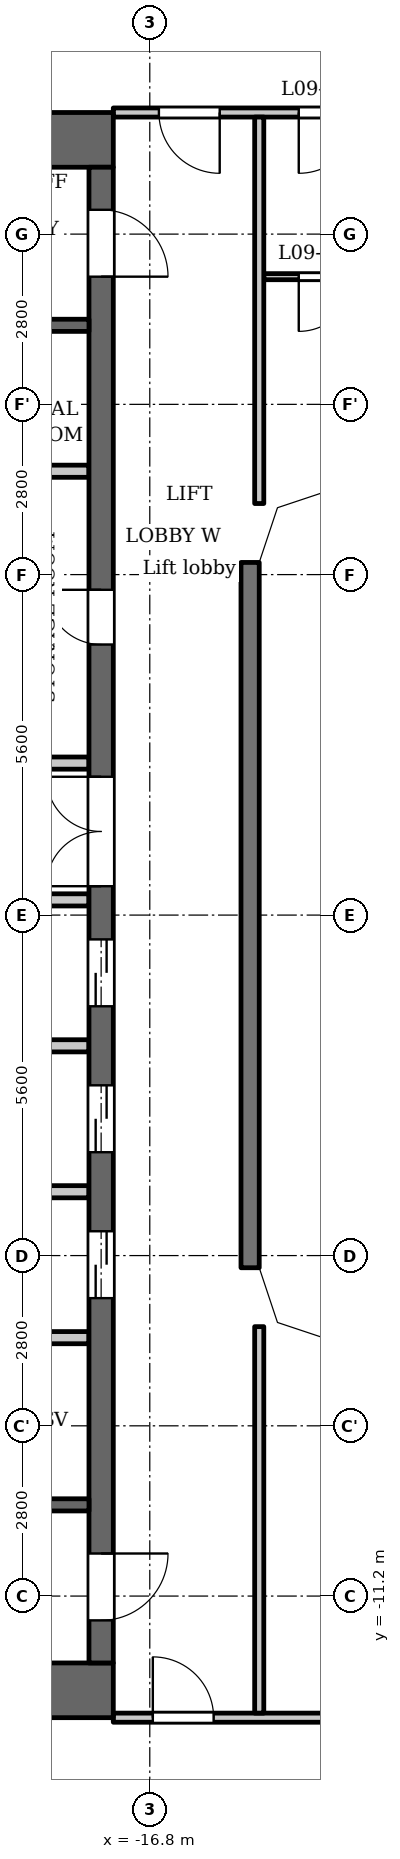
"""IFC4 building model, lengths in metres.
Left out: names, types, materials, properties, quantities, classifications, styles, units other than length and angle.
Written with IfcOpenShell. Run it as: python <this file> out.ifc"""

import sys

from ifc_helpers import new_model, si_unit, direction, frame, frame_2d, origin, place, context, subcontext, project, spatial, polyline, rectangle, outline, extrude, element, fill, save


model = new_model("IFC4")
c1 = context("Model", 3, precision=1e-05, world=origin(), true_north=direction((0.0, 1.0)))
c2 = subcontext(c1, "Body", "Model", "MODEL_VIEW")
j1 = project(units=[si_unit("LENGTHUNIT", "METRE"), si_unit("PLANEANGLEUNIT", "RADIAN")], contexts=[c1])
p1 = place(None, origin())
s1 = spatial("IfcSite", under=j1, at=p1, CompositionType="ELEMENT")
p2 = place(p1, origin())
s2 = spatial("IfcBuilding", under=s1, at=p2, CompositionType="ELEMENT")
p3 = place(p2, frame((0.0, 0.0, 41.0)))
s3 = spatial("IfcBuildingStorey", under=s2, at=p3, CompositionType="ELEMENT", Elevation=41.0)
p4 = place(p3, frame((-15.15, -5.8, 0.0), z_axis=(0.0, 0.0, 1.0), x_axis=(0.0, 1.0, 0.0)))
e1 = element("IfcWall", 1, at=p4, inside=s3, PredefinedType="SOLIDWALL", context=c2, shape_type="SweptSolid", body=[
    extrude(rectangle(XDim=11.6, YDim=0.3, at=frame_2d((5.8, 0.0))), origin(), (0.0, 0.0, 1.0), 3.2),
])
for number, where, z_axis, x_axis in (
    (2, (-17.4, 12.75, 0.0), (0.0, 0.0, 1.0), (-1.0, 0.0, 0.0)),
    (3, (-17.4, -12.75, 0.0), (0.0, 0.0, 1.0), (-1.0, 0.0, 0.0)),
):
    element("IfcWall", number, at=place(p3, frame(where, z_axis=z_axis, x_axis=x_axis)), inside=s3, PredefinedType="SHEAR", context=c2, shape_type="SweptSolid", body=[
        extrude(rectangle(XDim=10.4, YDim=0.9, at=frame_2d((5.2, 0.0))), origin(), (0.0, 0.0, 1.0), 3.2),
    ])
p5 = place(p3, frame((-17.6, -12.3, 0.0), z_axis=(0.0, 0.0, 1.0), x_axis=(0.0, 1.0, 0.0)))
e4 = element("IfcWall", 4, at=p5, inside=s3, PredefinedType="SHEAR", context=c2, shape_type="SweptSolid", body=[
    extrude(rectangle(XDim=24.6, YDim=0.4, at=frame_2d((12.3, 0.0))), origin(), (0.0, 0.0, 1.0), 3.2),
])
p6 = place(p5, frame((6.0, 0.0, 0.0)))
e5 = element("IfcOpeningElement", 5, at=p6, cuts=e4, PredefinedType="OPENING", context=c2, shape_type="SweptSolid", body=[
    extrude(rectangle(XDim=1.1, YDim=2.1, at=frame_2d((0.55, 1.05))), frame((0.0, 0.21, 0.0), z_axis=(0.0, -1.0, 0.0), x_axis=(1.0, 0.0, 0.0)), (0.0, 0.0, 1.0), 0.42),
])
p7 = place(p5, frame((8.4, 0.0, 0.0)))
e6 = element("IfcOpeningElement", 6, at=p7, cuts=e4, PredefinedType="OPENING", context=c2, shape_type="SweptSolid", body=[
    extrude(rectangle(XDim=1.1, YDim=2.1, at=frame_2d((0.55, 1.05))), frame((0.0, 0.21, 0.0), z_axis=(0.0, -1.0, 0.0), x_axis=(1.0, 0.0, 0.0)), (0.0, 0.0, 1.0), 0.42),
])
p8 = place(p5, frame((10.8, 0.0, 0.0)))
e7 = element("IfcOpeningElement", 7, at=p8, cuts=e4, PredefinedType="OPENING", context=c2, shape_type="SweptSolid", body=[
    extrude(rectangle(XDim=1.1, YDim=2.1, at=frame_2d((0.55, 1.05))), frame((0.0, 0.21, 0.0), z_axis=(0.0, -1.0, 0.0), x_axis=(1.0, 0.0, 0.0)), (0.0, 0.0, 1.0), 0.42),
])
p9 = place(p5, frame((16.75, 0.0, 0.0)))
e8 = element("IfcOpeningElement", 8, at=p9, cuts=e4, PredefinedType="OPENING", context=c2, shape_type="SweptSolid", body=[
    extrude(rectangle(XDim=0.9, YDim=2.1, at=frame_2d((0.45, 1.05))), frame((0.0, 0.21, 0.0), z_axis=(0.0, -1.0, 0.0), x_axis=(1.0, 0.0, 0.0)), (0.0, 0.0, 1.0), 0.42),
])
p10 = place(p5, frame((22.8, 0.0, 0.0)))
e9 = element("IfcOpeningElement", 9, at=p10, cuts=e4, PredefinedType="OPENING", context=c2, shape_type="SweptSolid", body=[
    extrude(rectangle(XDim=1.1, YDim=2.1, at=frame_2d((0.55, 1.05))), frame((0.0, 0.21, 0.0), z_axis=(0.0, -1.0, 0.0), x_axis=(1.0, 0.0, 0.0)), (0.0, 0.0, 1.0), 0.42),
])
p11 = place(p5, frame((0.7, 0.0, 0.0)))
e10 = element("IfcOpeningElement", 10, at=p11, cuts=e4, PredefinedType="OPENING", context=c2, shape_type="SweptSolid", body=[
    extrude(rectangle(XDim=1.1, YDim=2.1, at=frame_2d((0.55, 1.05))), frame((0.0, 0.21, 0.0), z_axis=(0.0, -1.0, 0.0), x_axis=(1.0, 0.0, 0.0)), (0.0, 0.0, 1.0), 0.42),
])
p12 = place(p5, frame((12.775, 0.0, 0.0)))
e11 = element("IfcOpeningElement", 11, at=p12, cuts=e4, PredefinedType="OPENING", context=c2, shape_type="SweptSolid", body=[
    extrude(rectangle(XDim=1.8, YDim=2.1, at=frame_2d((0.9, 1.05))), frame((0.0, 0.21, 0.0), z_axis=(0.0, -1.0, 0.0), x_axis=(1.0, 0.0, 0.0)), (0.0, 0.0, 1.0), 0.42),
])
p13 = place(p3, frame((-17.8, -9.7, 0.0), z_axis=(0.0, 0.0, 1.0), x_axis=(-1.0, 0.0, 0.0)))
e12 = element("IfcWall", 12, at=p13, inside=s3, PredefinedType="SHEAR", context=c2, shape_type="SweptSolid", body=[
    extrude(rectangle(XDim=8.3, YDim=0.2, at=frame_2d((4.15, 0.0))), origin(), (0.0, 0.0, 1.0), 3.2),
])
p14 = place(p13, frame((0.85, 0.0, 0.0)))
e13 = element("IfcOpeningElement", 13, at=p14, cuts=e12, PredefinedType="OPENING", context=c2, shape_type="SweptSolid", body=[
    extrude(rectangle(XDim=1.1, YDim=2.1, at=frame_2d((0.55, 1.05))), frame((0.0, 0.11, 0.0), z_axis=(0.0, -1.0, 0.0), x_axis=(1.0, 0.0, 0.0)), (0.0, 0.0, 1.0), 0.22),
])
p15 = place(p13, frame((3.75, 0.0, 0.0)))
e14 = element("IfcOpeningElement", 14, at=p15, cuts=e12, PredefinedType="OPENING", context=c2, shape_type="SweptSolid", body=[
    extrude(rectangle(XDim=1.1, YDim=2.1, at=frame_2d((0.55, 1.05))), frame((0.0, 0.11, 0.0), z_axis=(0.0, -1.0, 0.0), x_axis=(1.0, 0.0, 0.0)), (0.0, 0.0, 1.0), 0.22),
])
for number, where, z_axis, x_axis in (
    (15, (-17.8, -6.95, 0.0), (0.0, 0.0, 1.0), (-1.0, 0.0, 0.0)),
    (16, (-17.8, -4.55, 0.0), (0.0, 0.0, 1.0), (-1.0, 0.0, 0.0)),
    (17, (-17.8, -2.15, 0.0), (0.0, 0.0, 1.0), (-1.0, 0.0, 0.0)),
):
    element("IfcWall", number, at=place(p3, frame(where, z_axis=z_axis, x_axis=x_axis)), inside=s3, PredefinedType="PARTITIONING", context=c2, shape_type="SweptSolid", body=[
        extrude(rectangle(XDim=2.8, YDim=0.2, at=frame_2d((1.4, 0.0))), origin(), (0.0, 0.0, 1.0), 3.2),
    ])
p16 = place(p3, frame((-17.8, 0.25, 0.0), z_axis=(0.0, 0.0, 1.0), x_axis=(-1.0, 0.0, 0.0)))
e18 = element("IfcWall", 18, at=p16, inside=s3, PredefinedType="PARTITIONING", context=c2, shape_type="SweptSolid", body=[
    extrude(rectangle(XDim=3.0, YDim=0.2, at=frame_2d((1.5, 0.0))), origin(), (0.0, 0.0, 1.0), 3.2),
])
p17 = place(p3, frame((-17.8, 2.5, 0.0), z_axis=(0.0, 0.0, 1.0), x_axis=(-1.0, 0.0, 0.0)))
e19 = element("IfcWall", 19, at=p17, inside=s3, PredefinedType="PARTITIONING", context=c2, shape_type="SweptSolid", body=[
    extrude(rectangle(XDim=3.0, YDim=0.2, at=frame_2d((1.5, 0.0))), origin(), (0.0, 0.0, 1.0), 3.2),
])
p18 = place(p17, frame((1.7, 0.0, 0.0)))
e20 = element("IfcOpeningElement", 20, at=p18, cuts=e19, PredefinedType="OPENING", context=c2, shape_type="SweptSolid", body=[
    extrude(rectangle(XDim=0.9, YDim=2.1, at=frame_2d((0.45, 1.05))), frame((0.0, 0.11, 0.0), z_axis=(0.0, -1.0, 0.0), x_axis=(1.0, 0.0, 0.0)), (0.0, 0.0, 1.0), 0.22),
])
p19 = place(p3, frame((-17.8, 7.3, 0.0), z_axis=(0.0, 0.0, 1.0), x_axis=(-1.0, 0.0, 0.0)))
e21 = element("IfcWall", 21, at=p19, inside=s3, PredefinedType="PARTITIONING", context=c2, shape_type="SweptSolid", body=[
    extrude(rectangle(XDim=2.8, YDim=0.2, at=frame_2d((1.4, 0.0))), origin(), (0.0, 0.0, 1.0), 3.2),
])
p20 = place(p3, frame((-17.8, 9.7, 0.0), z_axis=(0.0, 0.0, 1.0), x_axis=(-1.0, 0.0, 0.0)))
e22 = element("IfcWall", 22, at=p20, inside=s3, PredefinedType="SHEAR", context=c2, shape_type="SweptSolid", body=[
    extrude(rectangle(XDim=8.3, YDim=0.2, at=frame_2d((4.15, 0.0))), origin(), (0.0, 0.0, 1.0), 3.2),
])
p21 = place(p20, frame((0.85, 0.0, 0.0)))
e23 = element("IfcOpeningElement", 23, at=p21, cuts=e22, PredefinedType="OPENING", context=c2, shape_type="SweptSolid", body=[
    extrude(rectangle(XDim=1.1, YDim=2.1, at=frame_2d((0.55, 1.05))), frame((0.0, 0.11, 0.0), z_axis=(0.0, -1.0, 0.0), x_axis=(1.0, 0.0, 0.0)), (0.0, 0.0, 1.0), 0.22),
])
p22 = place(p20, frame((3.75, 0.0, 0.0)))
e24 = element("IfcOpeningElement", 24, at=p22, cuts=e22, PredefinedType="OPENING", context=c2, shape_type="SweptSolid", body=[
    extrude(rectangle(XDim=1.1, YDim=2.1, at=frame_2d((0.55, 1.05))), frame((0.0, 0.11, 0.0), z_axis=(0.0, -1.0, 0.0), x_axis=(1.0, 0.0, 0.0)), (0.0, 0.0, 1.0), 0.22),
])
p23 = place(p3, frame((-17.4, -13.2, 0.0), z_axis=(0.0, 0.0, 1.0), x_axis=(1.0, 0.0, 0.0)))
e25 = element("IfcWall", 25, at=p23, inside=s3, PredefinedType="PARTITIONING", context=c2, shape_type="SweptSolid", body=[
    extrude(rectangle(XDim=34.8, YDim=0.15, at=frame_2d((17.4, 0.0))), origin(), (0.0, 0.0, 1.0), 3.2),
])
p24 = place(p23, frame((0.65, 0.0, 0.0)))
e26 = element("IfcOpeningElement", 26, at=p24, cuts=e25, PredefinedType="OPENING", context=c2, shape_type="SweptSolid", body=[
    extrude(rectangle(XDim=1.0, YDim=2.1, at=frame_2d((0.5, 1.05))), frame((0.0, 0.085, 0.0), z_axis=(0.0, -1.0, 0.0), x_axis=(1.0, 0.0, 0.0)), (0.0, 0.0, 1.0), 0.17),
])
p25 = place(p23, frame((33.05, 0.0, 0.0)))
e27 = element("IfcOpeningElement", 27, at=p25, cuts=e25, PredefinedType="OPENING", context=c2, shape_type="SweptSolid", body=[
    extrude(rectangle(XDim=1.0, YDim=2.1, at=frame_2d((0.5, 1.05))), frame((0.0, 0.085, 0.0), z_axis=(0.0, -1.0, 0.0), x_axis=(1.0, 0.0, 0.0)), (0.0, 0.0, 1.0), 0.17),
])
p26 = place(p23, frame((4.55, 0.0, 0.0)))
e28 = element("IfcOpeningElement", 28, at=p26, cuts=e25, PredefinedType="OPENING", context=c2, shape_type="SweptSolid", body=[
    extrude(rectangle(XDim=1.0, YDim=2.1, at=frame_2d((0.5, 1.05))), frame((0.0, 0.085, 0.0), z_axis=(0.0, -1.0, 0.0), x_axis=(1.0, 0.0, 0.0)), (0.0, 0.0, 1.0), 0.17),
])
p27 = place(p23, frame((6.9, 0.0, 0.0)))
e29 = element("IfcOpeningElement", 29, at=p27, cuts=e25, PredefinedType="OPENING", context=c2, shape_type="SweptSolid", body=[
    extrude(rectangle(XDim=1.0, YDim=2.1, at=frame_2d((0.5, 1.05))), frame((0.0, 0.085, 0.0), z_axis=(0.0, -1.0, 0.0), x_axis=(1.0, 0.0, 0.0)), (0.0, 0.0, 1.0), 0.17),
])
p28 = place(p23, frame((15.75, 0.0, 0.0)))
e30 = element("IfcOpeningElement", 30, at=p28, cuts=e25, PredefinedType="OPENING", context=c2, shape_type="SweptSolid", body=[
    extrude(rectangle(XDim=1.0, YDim=2.1, at=frame_2d((0.5, 1.05))), frame((0.0, 0.085, 0.0), z_axis=(0.0, -1.0, 0.0), x_axis=(1.0, 0.0, 0.0)), (0.0, 0.0, 1.0), 0.17),
])
p29 = place(p23, frame((18.1, 0.0, 0.0)))
e31 = element("IfcOpeningElement", 31, at=p29, cuts=e25, PredefinedType="OPENING", context=c2, shape_type="SweptSolid", body=[
    extrude(rectangle(XDim=1.0, YDim=2.1, at=frame_2d((0.5, 1.05))), frame((0.0, 0.085, 0.0), z_axis=(0.0, -1.0, 0.0), x_axis=(1.0, 0.0, 0.0)), (0.0, 0.0, 1.0), 0.17),
])
p30 = place(p23, frame((26.95, 0.0, 0.0)))
e32 = element("IfcOpeningElement", 32, at=p30, cuts=e25, PredefinedType="OPENING", context=c2, shape_type="SweptSolid", body=[
    extrude(rectangle(XDim=1.0, YDim=2.1, at=frame_2d((0.5, 1.05))), frame((0.0, 0.085, 0.0), z_axis=(0.0, -1.0, 0.0), x_axis=(1.0, 0.0, 0.0)), (0.0, 0.0, 1.0), 0.17),
])
p31 = place(p23, frame((29.25, 0.0, 0.0)))
e33 = element("IfcOpeningElement", 33, at=p31, cuts=e25, PredefinedType="OPENING", context=c2, shape_type="SweptSolid", body=[
    extrude(rectangle(XDim=1.0, YDim=2.1, at=frame_2d((0.5, 1.05))), frame((0.0, 0.085, 0.0), z_axis=(0.0, -1.0, 0.0), x_axis=(1.0, 0.0, 0.0)), (0.0, 0.0, 1.0), 0.17),
])
p32 = place(p3, frame((-14.925, 10.5, 0.0), z_axis=(0.0, 0.0, 1.0), x_axis=(1.0, 0.0, 0.0)))
e34 = element("IfcWall", 34, at=p32, inside=s3, PredefinedType="PARTITIONING", context=c2, shape_type="SweptSolid", body=[
    extrude(rectangle(XDim=29.85, YDim=0.1, at=frame_2d((14.925, 0.0))), origin(), (0.0, 0.0, 1.0), 3.2),
])
p33 = place(p32, frame((4.375, 0.0, 0.0)))
e35 = element("IfcOpeningElement", 35, at=p33, cuts=e34, PredefinedType="OPENING", context=c2, shape_type="SweptSolid", body=[
    extrude(rectangle(XDim=0.8, YDim=2.1, at=frame_2d((0.4, 1.05))), frame((0.0, 0.06, 0.0), z_axis=(0.0, -1.0, 0.0), x_axis=(1.0, 0.0, 0.0)), (0.0, 0.0, 1.0), 0.12),
])
p34 = place(p32, frame((0.575, 0.0, 0.0)))
e36 = element("IfcOpeningElement", 36, at=p34, cuts=e34, PredefinedType="OPENING", context=c2, shape_type="SweptSolid", body=[
    extrude(rectangle(XDim=0.9, YDim=2.1, at=frame_2d((0.45, 1.05))), frame((0.0, 0.06, 0.0), z_axis=(0.0, -1.0, 0.0), x_axis=(1.0, 0.0, 0.0)), (0.0, 0.0, 1.0), 0.12),
])
p35 = place(p32, frame((13.475, 0.0, 0.0)))
e37 = element("IfcOpeningElement", 37, at=p35, cuts=e34, PredefinedType="OPENING", context=c2, shape_type="SweptSolid", body=[
    extrude(rectangle(XDim=0.8, YDim=2.1, at=frame_2d((0.4, 1.05))), frame((0.0, 0.06, 0.0), z_axis=(0.0, -1.0, 0.0), x_axis=(1.0, 0.0, 0.0)), (0.0, 0.0, 1.0), 0.12),
])
p36 = place(p32, frame((9.975, 0.0, 0.0)))
e38 = element("IfcOpeningElement", 38, at=p36, cuts=e34, PredefinedType="OPENING", context=c2, shape_type="SweptSolid", body=[
    extrude(rectangle(XDim=0.9, YDim=2.1, at=frame_2d((0.45, 1.05))), frame((0.0, 0.06, 0.0), z_axis=(0.0, -1.0, 0.0), x_axis=(1.0, 0.0, 0.0)), (0.0, 0.0, 1.0), 0.12),
])
p37 = place(p32, frame((19.075, 0.0, 0.0)))
e39 = element("IfcOpeningElement", 39, at=p37, cuts=e34, PredefinedType="OPENING", context=c2, shape_type="SweptSolid", body=[
    extrude(rectangle(XDim=0.8, YDim=2.1, at=frame_2d((0.4, 1.05))), frame((0.0, 0.06, 0.0), z_axis=(0.0, -1.0, 0.0), x_axis=(1.0, 0.0, 0.0)), (0.0, 0.0, 1.0), 0.12),
])
p38 = place(p32, frame((16.075, 0.0, 0.0)))
e40 = element("IfcOpeningElement", 40, at=p38, cuts=e34, PredefinedType="OPENING", context=c2, shape_type="SweptSolid", body=[
    extrude(rectangle(XDim=0.9, YDim=2.1, at=frame_2d((0.45, 1.05))), frame((0.0, 0.06, 0.0), z_axis=(0.0, -1.0, 0.0), x_axis=(1.0, 0.0, 0.0)), (0.0, 0.0, 1.0), 0.12),
])
p39 = place(p32, frame((21.175, 0.0, 0.0)))
e41 = element("IfcOpeningElement", 41, at=p39, cuts=e34, PredefinedType="OPENING", context=c2, shape_type="SweptSolid", body=[
    extrude(rectangle(XDim=0.8, YDim=2.1, at=frame_2d((0.4, 1.05))), frame((0.0, 0.06, 0.0), z_axis=(0.0, -1.0, 0.0), x_axis=(1.0, 0.0, 0.0)), (0.0, 0.0, 1.0), 0.12),
])
p40 = place(p32, frame((26.775, 0.0, 0.0)))
e42 = element("IfcOpeningElement", 42, at=p40, cuts=e34, PredefinedType="OPENING", context=c2, shape_type="SweptSolid", body=[
    extrude(rectangle(XDim=0.9, YDim=2.1, at=frame_2d((0.45, 1.05))), frame((0.0, 0.06, 0.0), z_axis=(0.0, -1.0, 0.0), x_axis=(1.0, 0.0, 0.0)), (0.0, 0.0, 1.0), 0.12),
])
p41 = place(p3, frame((-17.4, 13.2, 0.0), z_axis=(0.0, 0.0, 1.0), x_axis=(1.0, 0.0, 0.0)))
e43 = element("IfcWall", 43, at=p41, inside=s3, PredefinedType="PARTITIONING", context=c2, shape_type="SweptSolid", body=[
    extrude(rectangle(XDim=34.8, YDim=0.15, at=frame_2d((17.4, 0.0))), origin(), (0.0, 0.0, 1.0), 3.2),
])
p42 = place(p41, frame((0.75, 0.0, 0.0)))
e44 = element("IfcOpeningElement", 44, at=p42, cuts=e43, PredefinedType="OPENING", context=c2, shape_type="SweptSolid", body=[
    extrude(rectangle(XDim=1.0, YDim=2.1, at=frame_2d((0.5, 1.05))), frame((0.0, 0.085, 0.0), z_axis=(0.0, -1.0, 0.0), x_axis=(1.0, 0.0, 0.0)), (0.0, 0.0, 1.0), 0.17),
])
p43 = place(p41, frame((33.15, 0.0, 0.0)))
e45 = element("IfcOpeningElement", 45, at=p43, cuts=e43, PredefinedType="OPENING", context=c2, shape_type="SweptSolid", body=[
    extrude(rectangle(XDim=1.0, YDim=2.1, at=frame_2d((0.5, 1.05))), frame((0.0, 0.085, 0.0), z_axis=(0.0, -1.0, 0.0), x_axis=(1.0, 0.0, 0.0)), (0.0, 0.0, 1.0), 0.17),
])
p44 = place(p41, frame((3.05, 0.0, 0.0)))
e46 = element("IfcOpeningElement", 46, at=p44, cuts=e43, PredefinedType="OPENING", context=c2, shape_type="SweptSolid", body=[
    extrude(rectangle(XDim=1.0, YDim=2.1, at=frame_2d((0.5, 1.05))), frame((0.0, 0.085, 0.0), z_axis=(0.0, -1.0, 0.0), x_axis=(1.0, 0.0, 0.0)), (0.0, 0.0, 1.0), 0.17),
])
p45 = place(p41, frame((12.45, 0.0, 0.0)))
e47 = element("IfcOpeningElement", 47, at=p45, cuts=e43, PredefinedType="OPENING", context=c2, shape_type="SweptSolid", body=[
    extrude(rectangle(XDim=1.0, YDim=2.1, at=frame_2d((0.5, 1.05))), frame((0.0, 0.085, 0.0), z_axis=(0.0, -1.0, 0.0), x_axis=(1.0, 0.0, 0.0)), (0.0, 0.0, 1.0), 0.17),
])
p46 = place(p41, frame((18.3, 0.0, 0.0)))
e48 = element("IfcOpeningElement", 48, at=p46, cuts=e43, PredefinedType="OPENING", context=c2, shape_type="SweptSolid", body=[
    extrude(rectangle(XDim=1.0, YDim=2.1, at=frame_2d((0.5, 1.05))), frame((0.0, 0.085, 0.0), z_axis=(0.0, -1.0, 0.0), x_axis=(1.0, 0.0, 0.0)), (0.0, 0.0, 1.0), 0.17),
])
p47 = place(p41, frame((29.25, 0.0, 0.0)))
e49 = element("IfcOpeningElement", 49, at=p47, cuts=e43, PredefinedType="OPENING", context=c2, shape_type="SweptSolid", body=[
    extrude(rectangle(XDim=1.0, YDim=2.1, at=frame_2d((0.5, 1.05))), frame((0.0, 0.085, 0.0), z_axis=(0.0, -1.0, 0.0), x_axis=(1.0, 0.0, 0.0)), (0.0, 0.0, 1.0), 0.17),
])
for number, where, z_axis, x_axis in (
    (50, (-15.0, -13.125, 0.0), (0.0, 0.0, 1.0), (0.0, 1.0, 0.0)),
    (51, (-15.0, 6.769, 0.0), (0.0, 0.0, 1.0), (0.0, 1.0, 0.0)),
):
    element("IfcWall", number, at=place(p3, frame(where, z_axis=z_axis, x_axis=x_axis)), inside=s3, PredefinedType="PARTITIONING", context=c2, shape_type="SweptSolid", body=[
        extrude(rectangle(XDim=6.356, YDim=0.15, at=frame_2d((3.178, 0.0))), origin(), (0.0, 0.0, 1.0), 3.2),
    ])
p48 = place(p3, origin())
e52 = element("IfcWall", 52, at=p48, inside=s3, PredefinedType="SOLIDWALL", context=c2, shape_type="SweptSolid", body=[
    extrude(outline(polyline([(-13.849, 7.3), (-14.937, 6.937), (-15.3, 5.849), (-15.3, 5.8), (-15.0, 5.8), (-14.7, 6.7), (-13.8, 7.0), (-13.8, 7.3), (-13.849, 7.3)])), origin(), (0.0, 0.0, 1.0), 3.2),
])
e53 = element("IfcWall", 53, at=p48, inside=s3, PredefinedType="SOLIDWALL", context=c2, shape_type="SweptSolid", body=[
    extrude(outline(polyline([(-14.937, -6.937), (-13.849, -7.3), (-13.8, -7.3), (-13.8, -7.0), (-14.7, -6.7), (-15.0, -5.8), (-15.3, -5.8), (-15.3, -5.849), (-14.937, -6.937)])), origin(), (0.0, 0.0, 1.0), 3.2),
])
p49 = place(p6, origin())
e54 = element("IfcDoor", 54, at=p49, inside=s3, OperationType="DOUBLE_DOOR_SLIDING", PredefinedType="DOOR", context=c2, shape_type="SweptSolid", body=[
    extrude(rectangle(XDim=1.1, YDim=2.1, at=frame_2d((0.55, 1.05))), frame((0.0, 0.025, 0.0), z_axis=(0.0, -1.0, 0.0), x_axis=(1.0, 0.0, 0.0)), (0.0, 0.0, 1.0), 0.05),
])
fill(e5, e54)
p50 = place(p7, origin())
e55 = element("IfcDoor", 55, at=p50, inside=s3, OperationType="DOUBLE_DOOR_SLIDING", PredefinedType="DOOR", context=c2, shape_type="SweptSolid", body=[
    extrude(rectangle(XDim=1.1, YDim=2.1, at=frame_2d((0.55, 1.05))), frame((0.0, 0.025, 0.0), z_axis=(0.0, -1.0, 0.0), x_axis=(1.0, 0.0, 0.0)), (0.0, 0.0, 1.0), 0.05),
])
fill(e6, e55)
p51 = place(p8, origin())
e56 = element("IfcDoor", 56, at=p51, inside=s3, OperationType="DOUBLE_DOOR_SLIDING", PredefinedType="DOOR", context=c2, shape_type="SweptSolid", body=[
    extrude(rectangle(XDim=1.1, YDim=2.1, at=frame_2d((0.55, 1.05))), frame((0.0, 0.025, 0.0), z_axis=(0.0, -1.0, 0.0), x_axis=(1.0, 0.0, 0.0)), (0.0, 0.0, 1.0), 0.05),
])
fill(e7, e56)
p52 = place(p9, origin())
e57 = element("IfcDoor", 57, at=p52, inside=s3, OperationType="SINGLE_SWING_LEFT", PredefinedType="DOOR", context=c2, shape_type="SweptSolid", body=[
    extrude(rectangle(XDim=0.9, YDim=2.1, at=frame_2d((0.45, 1.05))), frame((0.0, 0.025, 0.0), z_axis=(0.0, -1.0, 0.0), x_axis=(1.0, 0.0, 0.0)), (0.0, 0.0, 1.0), 0.05),
])
fill(e8, e57)
p53 = place(p10, origin())
e58 = element("IfcDoor", 58, at=p53, inside=s3, OperationType="SINGLE_SWING_LEFT", PredefinedType="DOOR", context=c2, shape_type="SweptSolid", body=[
    extrude(rectangle(XDim=1.1, YDim=2.1, at=frame_2d((0.55, 1.05))), frame((0.0, 0.025, 0.0), z_axis=(0.0, -1.0, 0.0), x_axis=(1.0, 0.0, 0.0)), (0.0, 0.0, 1.0), 0.05),
])
fill(e9, e58)
p54 = place(p11, origin())
e59 = element("IfcDoor", 59, at=p54, inside=s3, OperationType="SINGLE_SWING_RIGHT", PredefinedType="DOOR", context=c2, shape_type="SweptSolid", body=[
    extrude(rectangle(XDim=1.1, YDim=2.1, at=frame_2d((0.55, 1.05))), frame((0.0, 0.025, 0.0), z_axis=(0.0, -1.0, 0.0), x_axis=(1.0, 0.0, 0.0)), (0.0, 0.0, 1.0), 0.05),
])
fill(e10, e59)
p55 = place(p12, origin())
e60 = element("IfcDoor", 60, at=p55, inside=s3, OperationType="DOUBLE_DOOR_SINGLE_SWING", PredefinedType="DOOR", context=c2, shape_type="SweptSolid", body=[
    extrude(rectangle(XDim=1.8, YDim=2.1, at=frame_2d((0.9, 1.05))), frame((0.0, 0.025, 0.0), z_axis=(0.0, -1.0, 0.0), x_axis=(1.0, 0.0, 0.0)), (0.0, 0.0, 1.0), 0.05),
])
fill(e11, e60)
p56 = place(p42, origin())
e61 = element("IfcDoor", 61, at=p56, inside=s3, OperationType="SINGLE_SWING_RIGHT", PredefinedType="DOOR", context=c2, shape_type="SweptSolid", body=[
    extrude(rectangle(XDim=1.0, YDim=2.1, at=frame_2d((0.5, 1.05))), frame((0.0, 0.025, 0.0), z_axis=(0.0, -1.0, 0.0), x_axis=(1.0, 0.0, 0.0)), (0.0, 0.0, 1.0), 0.05),
])
fill(e44, e61)
p57 = place(p24, origin())
e62 = element("IfcDoor", 62, at=p57, inside=s3, OperationType="SINGLE_SWING_RIGHT", PredefinedType="DOOR", context=c2, shape_type="SweptSolid", body=[
    extrude(rectangle(XDim=1.0, YDim=2.1, at=frame_2d((0.5, 1.05))), frame((0.0, 0.025, 0.0), z_axis=(0.0, -1.0, 0.0), x_axis=(1.0, 0.0, 0.0)), (0.0, 0.0, 1.0), 0.05),
])
fill(e26, e62)
p58 = place(p44, origin())
e63 = element("IfcDoor", 63, at=p58, inside=s3, OperationType="SINGLE_SWING_LEFT", PredefinedType="DOOR", context=c2, shape_type="SweptSolid", body=[
    extrude(rectangle(XDim=1.0, YDim=2.1, at=frame_2d((0.5, 1.05))), frame((0.0, 0.025, 0.0), z_axis=(0.0, -1.0, 0.0), x_axis=(1.0, 0.0, 0.0)), (0.0, 0.0, 1.0), 0.05),
])
fill(e46, e63)
p59 = place(p34, origin())
e64 = element("IfcDoor", 64, at=p59, inside=s3, OperationType="SINGLE_SWING_LEFT", PredefinedType="DOOR", context=c2, shape_type="SweptSolid", body=[
    extrude(rectangle(XDim=0.9, YDim=2.1, at=frame_2d((0.45, 1.05))), frame((0.0, 0.025, 0.0), z_axis=(0.0, -1.0, 0.0), x_axis=(1.0, 0.0, 0.0)), (0.0, 0.0, 1.0), 0.05),
])
fill(e36, e64)
save(model, sys.argv[1])
